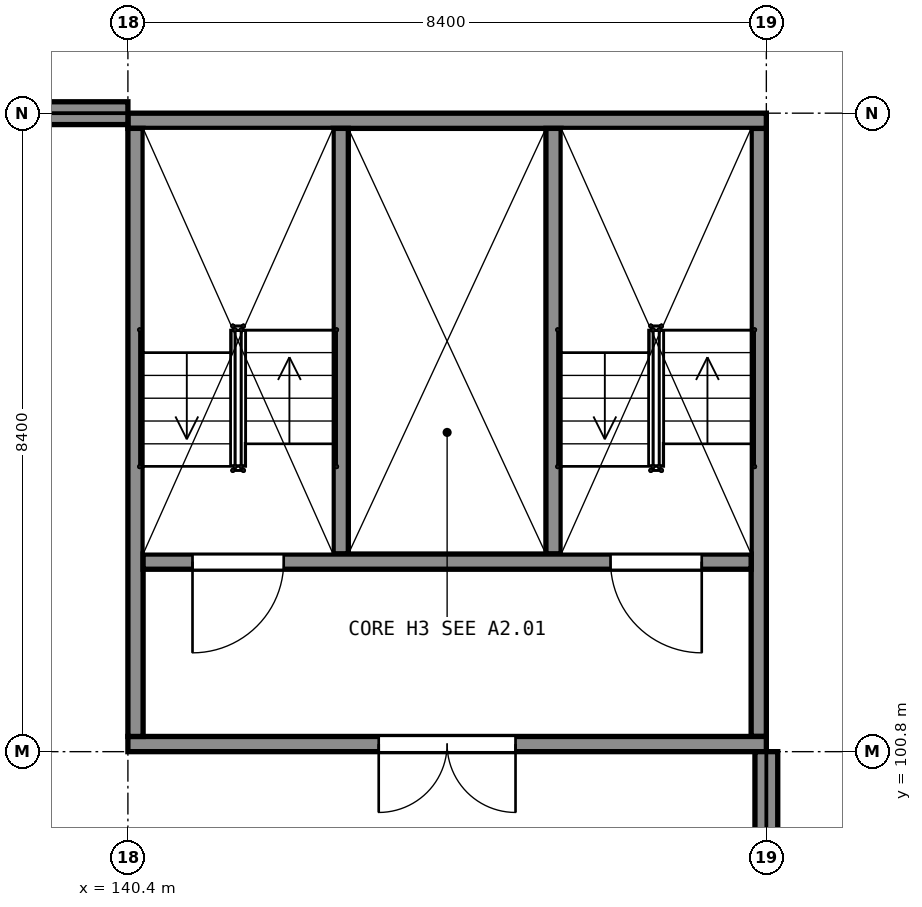
"""IFC4 building model, lengths in metres.
Left out: names, types, materials, properties, quantities, classifications, styles, units other than length and angle.
Written with IfcOpenShell. Run it as: python <this file> out.ifc"""

import sys

from ifc_helpers import new_model, si_unit, direction, frame, frame_2d, origin, place, context, subcontext, project, spatial, rectangle, extrude, element, fill, save


model = new_model("IFC4")
c1 = context("Model", 3, precision=1e-05, world=origin(), true_north=direction((0.0, 1.0)))
c2 = subcontext(c1, "Body", "Model", "MODEL_VIEW")
j1 = project(units=[si_unit("LENGTHUNIT", "METRE"), si_unit("PLANEANGLEUNIT", "RADIAN")], contexts=[c1])
p1 = place(None, origin())
s1 = spatial("IfcSite", under=j1, at=p1, CompositionType="ELEMENT")
p2 = place(p1, origin())
s2 = spatial("IfcBuilding", under=s1, at=p2, CompositionType="ELEMENT")
p3 = place(p2, frame((0.0, 0.0, 20.0)))
s3 = spatial("IfcBuildingStorey", under=s2, at=p3, CompositionType="ELEMENT", Elevation=20.0)
p4 = place(p3, frame((140.4, 100.9, 0.0), z_axis=(0.0, 0.0, 1.0), x_axis=(1.0, 0.0, 0.0)))
e1 = element("IfcWall", 1, at=p4, inside=s3, PredefinedType="SHEAR", context=c2, shape_type="SweptSolid", body=[
    extrude(rectangle(XDim=8.4, YDim=0.2, at=frame_2d((4.2, 0.0))), origin(), (0.0, 0.0, 1.0), 5.0),
])
p5 = place(p4, frame((3.3, 0.0, 0.0)))
e2 = element("IfcOpeningElement", 2, at=p5, cuts=e1, PredefinedType="OPENING", context=c2, shape_type="SweptSolid", body=[
    extrude(rectangle(XDim=1.8, YDim=2.1, at=frame_2d((0.9, 1.05))), frame((0.0, 0.11, 0.0), z_axis=(0.0, -1.0, 0.0), x_axis=(1.0, 0.0, 0.0)), (0.0, 0.0, 1.0), 0.22),
])
p6 = place(p3, frame((140.4, 109.1, 0.0), z_axis=(0.0, 0.0, 1.0), x_axis=(1.0, 0.0, 0.0)))
e3 = element("IfcWall", 3, at=p6, inside=s3, PredefinedType="SHEAR", context=c2, shape_type="SweptSolid", body=[
    extrude(rectangle(XDim=8.4, YDim=0.2, at=frame_2d((4.2, 0.0))), origin(), (0.0, 0.0, 1.0), 5.0),
])
for number, where, z_axis, x_axis in (
    (4, (140.5, 101.0, 0.0), (0.0, 0.0, 1.0), (0.0, 1.0, 0.0)),
    (5, (148.7, 101.0, 0.0), (0.0, 0.0, 1.0), (0.0, 1.0, 0.0)),
):
    element("IfcWall", number, at=place(p3, frame(where, z_axis=z_axis, x_axis=x_axis)), inside=s3, PredefinedType="SHEAR", context=c2, shape_type="SweptSolid", body=[
        extrude(rectangle(XDim=8.0, YDim=0.2, at=frame_2d((4.0, 0.0))), origin(), (0.0, 0.0, 1.0), 5.0),
    ])
p7 = place(p3, frame((140.6, 103.3, 0.0), z_axis=(0.0, 0.0, 1.0), x_axis=(1.0, 0.0, 0.0)))
e6 = element("IfcWall", 6, at=p7, inside=s3, PredefinedType="SHEAR", context=c2, shape_type="SweptSolid", body=[
    extrude(rectangle(XDim=8.0, YDim=0.2, at=frame_2d((4.0, 0.0))), origin(), (0.0, 0.0, 1.0), 5.0),
])
p8 = place(p7, frame((0.65, 0.0, 0.0)))
e7 = element("IfcOpeningElement", 7, at=p8, cuts=e6, PredefinedType="OPENING", context=c2, shape_type="SweptSolid", body=[
    extrude(rectangle(XDim=1.2, YDim=2.1, at=frame_2d((0.6, 1.05))), frame((0.0, 0.11, 0.0), z_axis=(0.0, -1.0, 0.0), x_axis=(1.0, 0.0, 0.0)), (0.0, 0.0, 1.0), 0.22),
])
p9 = place(p7, frame((6.15, 0.0, 0.0)))
e8 = element("IfcOpeningElement", 8, at=p9, cuts=e6, PredefinedType="OPENING", context=c2, shape_type="SweptSolid", body=[
    extrude(rectangle(XDim=1.2, YDim=2.1, at=frame_2d((0.6, 1.05))), frame((0.0, 0.11, 0.0), z_axis=(0.0, -1.0, 0.0), x_axis=(1.0, 0.0, 0.0)), (0.0, 0.0, 1.0), 0.22),
])
for number, where, z_axis, x_axis in (
    (9, (143.2, 103.4, 0.0), (0.0, 0.0, 1.0), (0.0, 1.0, 0.0)),
    (10, (146.0, 103.4, 0.0), (0.0, 0.0, 1.0), (0.0, 1.0, 0.0)),
):
    element("IfcWall", number, at=place(p3, frame(where, z_axis=z_axis, x_axis=x_axis)), inside=s3, PredefinedType="SHEAR", context=c2, shape_type="SweptSolid", body=[
        extrude(rectangle(XDim=5.6, YDim=0.2, at=frame_2d((2.8, 0.0))), origin(), (0.0, 0.0, 1.0), 5.0),
    ])
p10 = place(p3, frame((148.8, 92.75, 0.0), z_axis=(0.0, 0.0, 1.0), x_axis=(0.0, 1.0, 0.0)))
e11 = element("IfcWall", 11, at=p10, inside=s3, PredefinedType="SOLIDWALL", context=c2, shape_type="SweptSolid", body=[
    extrude(rectangle(XDim=8.05, YDim=0.3, at=frame_2d((4.025, 0.0))), origin(), (0.0, 0.0, 1.0), 2.242),
])
p11 = place(p3, frame((132.0, 109.2, 0.0), z_axis=(0.0, 0.0, 1.0), x_axis=(1.0, 0.0, 0.0)))
e12 = element("IfcWall", 12, at=p11, inside=s3, PredefinedType="SOLIDWALL", context=c2, shape_type="SweptSolid", body=[
    extrude(rectangle(XDim=8.4, YDim=0.3, at=frame_2d((4.2, 0.0))), origin(), (0.0, 0.0, 1.0), 3.94),
])
p12 = place(p5, origin())
e13 = element("IfcDoor", 13, at=p12, inside=s3, OperationType="DOUBLE_DOOR_SINGLE_SWING", PredefinedType="DOOR", context=c2, shape_type="SweptSolid", body=[
    extrude(rectangle(XDim=1.8, YDim=2.1, at=frame_2d((0.9, 1.05))), frame((0.0, 0.025, 0.0), z_axis=(0.0, -1.0, 0.0), x_axis=(1.0, 0.0, 0.0)), (0.0, 0.0, 1.0), 0.05),
])
fill(e2, e13)
p13 = place(p8, origin())
e14 = element("IfcDoor", 14, at=p13, inside=s3, OperationType="SINGLE_SWING_LEFT", PredefinedType="DOOR", context=c2, shape_type="SweptSolid", body=[
    extrude(rectangle(XDim=1.2, YDim=2.1, at=frame_2d((0.6, 1.05))), frame((0.0, 0.025, 0.0), z_axis=(0.0, -1.0, 0.0), x_axis=(1.0, 0.0, 0.0)), (0.0, 0.0, 1.0), 0.05),
])
fill(e7, e14)
p14 = place(p9, origin())
e15 = element("IfcDoor", 15, at=p14, inside=s3, OperationType="SINGLE_SWING_RIGHT", PredefinedType="DOOR", context=c2, shape_type="SweptSolid", body=[
    extrude(rectangle(XDim=1.2, YDim=2.1, at=frame_2d((0.6, 1.05))), frame((0.0, 0.025, 0.0), z_axis=(0.0, -1.0, 0.0), x_axis=(1.0, 0.0, 0.0)), (0.0, 0.0, 1.0), 0.05),
])
fill(e8, e15)
save(model, sys.argv[1])
